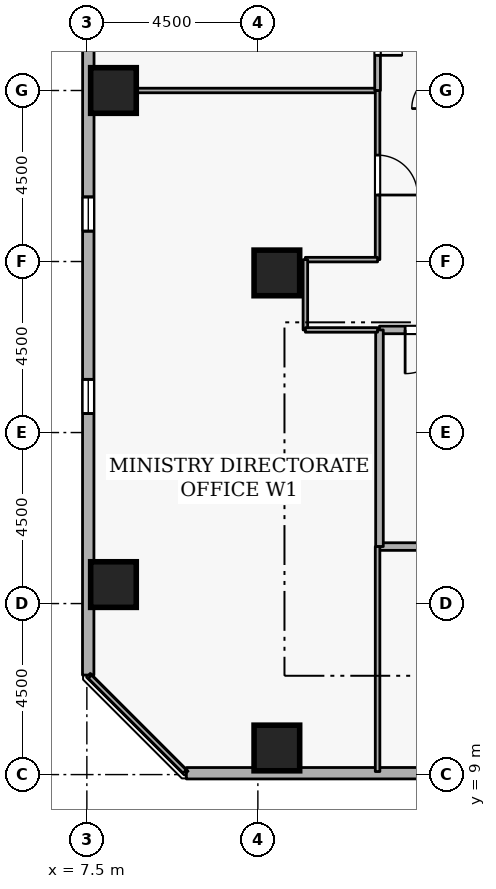
"""IFC4 building model, lengths in metres.
Left out: names, types, materials, properties, quantities, classifications, styles, units other than length and angle.
Written with IfcOpenShell. Run it as: python <this file> out.ifc"""

import sys

from ifc_helpers import new_model, si_unit, direction, frame, frame_2d, origin, origin_2d, place, context, subcontext, project, spatial, rectangle, extrude, element, fill, save


model = new_model("IFC4")
c1 = context("Model", 3, precision=1e-05, world=origin(), true_north=direction((0.0, 1.0)))
c2 = subcontext(c1, "Body", "Model", "MODEL_VIEW")
j1 = project(units=[si_unit("LENGTHUNIT", "METRE"), si_unit("PLANEANGLEUNIT", "RADIAN")], contexts=[c1])
p1 = place(None, origin())
s1 = spatial("IfcSite", under=j1, at=p1, CompositionType="ELEMENT")
p2 = place(p1, origin())
s2 = spatial("IfcBuilding", under=s1, at=p2, CompositionType="ELEMENT")
p3 = place(p2, frame((0.0, 0.0, 90.9)))
s3 = spatial("IfcBuildingStorey", under=s2, at=p3, CompositionType="ELEMENT", Elevation=90.9)
for number, where, z_axis, x_axis in (
    (1, (12.5, 9.7, 0.0), (0.0, 0.0, 1.0), (1.0, 0.0, 0.0)),
    (2, (8.2, 14.0, 0.0), (0.0, 0.0, 1.0), (1.0, 0.0, 0.0)),
    (3, (8.2, 27.0, 0.0), (0.0, 0.0, 1.0), (1.0, 0.0, 0.0)),
    (4, (12.5, 22.2, 0.0), (0.0, 0.0, 1.0), (1.0, 0.0, 0.0)),
):
    element("IfcColumn", number, at=place(p3, frame(where, z_axis=z_axis, x_axis=x_axis)), inside=s3, PredefinedType="COLUMN", context=c2, shape_type="SweptSolid", body=[
        extrude(rectangle(XDim=1.2, YDim=1.2, at=origin_2d()), origin(), (0.0, 0.0, 1.0), 3.6),
    ])
p4 = place(p3, frame((10.119, 9.035, 0.0), z_axis=(0.0, 0.0, 1.0), x_axis=(0.99999997744, 0.000212414941, 0.0)))
e5 = element("IfcWall", 5, at=p4, inside=s3, PredefinedType="STANDARD", context=c2, shape_type="SweptSolid", body=[
    extrude(rectangle(XDim=34.481, YDim=0.3, at=frame_2d((17.24, 0.0))), origin(), (0.0, 0.0, 1.0), 2.7),
])
p5 = place(p4, frame((7.5, 0.0, 0.72)))
e6 = element("IfcOpeningElement", 6, at=p5, cuts=e5, PredefinedType="OPENING", context=c2, shape_type="SweptSolid", body=[
    extrude(rectangle(XDim=0.9, YDim=1.75, at=frame_2d((0.45, 0.875))), frame((0.0, 0.16, 0.0), z_axis=(0.0, -1.0, 0.0), x_axis=(1.0, 0.0, 0.0)), (0.0, 0.0, 1.0), 0.32),
])
p6 = place(p4, frame((12.3, 0.0, 0.72)))
e7 = element("IfcOpeningElement", 7, at=p6, cuts=e5, PredefinedType="OPENING", context=c2, shape_type="SweptSolid", body=[
    extrude(rectangle(XDim=0.9, YDim=1.75, at=frame_2d((0.45, 0.875))), frame((0.0, 0.16, 0.0), z_axis=(0.0, -1.0, 0.0), x_axis=(1.0, 0.0, 0.0)), (0.0, 0.0, 1.0), 0.32),
])
p7 = place(p4, frame((17.1, 0.0, 0.72)))
e8 = element("IfcOpeningElement", 8, at=p7, cuts=e5, PredefinedType="OPENING", context=c2, shape_type="SweptSolid", body=[
    extrude(rectangle(XDim=0.9, YDim=1.75, at=frame_2d((0.45, 0.875))), frame((0.0, 0.16, 0.0), z_axis=(0.0, -1.0, 0.0), x_axis=(1.0, 0.0, 0.0)), (0.0, 0.0, 1.0), 0.32),
])
p8 = place(p4, frame((21.9, 0.0, 0.72)))
e9 = element("IfcOpeningElement", 9, at=p8, cuts=e5, PredefinedType="OPENING", context=c2, shape_type="SweptSolid", body=[
    extrude(rectangle(XDim=0.9, YDim=1.75, at=frame_2d((0.45, 0.875))), frame((0.0, 0.16, 0.0), z_axis=(0.0, -1.0, 0.0), x_axis=(1.0, 0.0, 0.0)), (0.0, 0.0, 1.0), 0.32),
])
p9 = place(p4, frame((31.5, 0.0, 0.72)))
e10 = element("IfcOpeningElement", 10, at=p9, cuts=e5, PredefinedType="OPENING", context=c2, shape_type="SweptSolid", body=[
    extrude(rectangle(XDim=0.9, YDim=1.75, at=frame_2d((0.45, 0.875))), frame((0.0, 0.16, 0.0), z_axis=(0.0, -1.0, 0.0), x_axis=(1.0, 0.0, 0.0)), (0.0, 0.0, 1.0), 0.32),
])
p10 = place(p3, frame((7.543, 46.099, 0.0), z_axis=(0.0, 0.0, 1.0), x_axis=(-0.000212414941, -0.99999997744, 0.0)))
e11 = element("IfcWall", 11, at=p10, inside=s3, PredefinedType="STANDARD", context=c2, shape_type="SweptSolid", body=[
    extrude(rectangle(XDim=34.481, YDim=0.3, at=frame_2d((17.24, 0.0))), origin(), (0.0, 0.0, 1.0), 2.7),
])
p11 = place(p10, frame((7.5, 0.0, 0.72)))
e12 = element("IfcOpeningElement", 12, at=p11, cuts=e11, PredefinedType="OPENING", context=c2, shape_type="SweptSolid", body=[
    extrude(rectangle(XDim=0.9, YDim=1.75, at=frame_2d((0.45, 0.875))), frame((0.0, 0.16, 0.0), z_axis=(0.0, -1.0, 0.0), x_axis=(1.0, 0.0, 0.0)), (0.0, 0.0, 1.0), 0.32),
])
p12 = place(p10, frame((12.3, 0.0, 0.72)))
e13 = element("IfcOpeningElement", 13, at=p12, cuts=e11, PredefinedType="OPENING", context=c2, shape_type="SweptSolid", body=[
    extrude(rectangle(XDim=0.9, YDim=1.75, at=frame_2d((0.45, 0.875))), frame((0.0, 0.16, 0.0), z_axis=(0.0, -1.0, 0.0), x_axis=(1.0, 0.0, 0.0)), (0.0, 0.0, 1.0), 0.32),
])
p13 = place(p10, frame((17.1, 0.0, 0.72)))
e14 = element("IfcOpeningElement", 14, at=p13, cuts=e11, PredefinedType="OPENING", context=c2, shape_type="SweptSolid", body=[
    extrude(rectangle(XDim=0.9, YDim=1.75, at=frame_2d((0.45, 0.875))), frame((0.0, 0.16, 0.0), z_axis=(0.0, -1.0, 0.0), x_axis=(1.0, 0.0, 0.0)), (0.0, 0.0, 1.0), 0.32),
])
p14 = place(p10, frame((21.9, 0.0, 0.72)))
e15 = element("IfcOpeningElement", 15, at=p14, cuts=e11, PredefinedType="OPENING", context=c2, shape_type="SweptSolid", body=[
    extrude(rectangle(XDim=0.9, YDim=1.75, at=frame_2d((0.45, 0.875))), frame((0.0, 0.16, 0.0), z_axis=(0.0, -1.0, 0.0), x_axis=(1.0, 0.0, 0.0)), (0.0, 0.0, 1.0), 0.32),
])
p15 = place(p10, frame((26.7, 0.0, 0.72)))
e16 = element("IfcOpeningElement", 16, at=p15, cuts=e11, PredefinedType="OPENING", context=c2, shape_type="SweptSolid", body=[
    extrude(rectangle(XDim=0.9, YDim=1.75, at=frame_2d((0.45, 0.875))), frame((0.0, 0.16, 0.0), z_axis=(0.0, -1.0, 0.0), x_axis=(1.0, 0.0, 0.0)), (0.0, 0.0, 1.0), 0.32),
])
p16 = place(p3, frame((15.2, 15.0, 0.0), z_axis=(0.0, 0.0, 1.0), x_axis=(1.0, 0.0, 0.0)))
e17 = element("IfcWall", 17, at=p16, inside=s3, PredefinedType="STANDARD", context=c2, shape_type="SweptSolid", body=[
    extrude(rectangle(XDim=2.5, YDim=0.2, at=frame_2d((1.25, 0.0))), origin(), (0.0, 0.0, 1.0), 3.34),
])
p17 = place(p3, frame((17.7, 20.7, 0.0), z_axis=(0.0, 0.0, 1.0), x_axis=(-1.0, 0.0, 0.0)))
e18 = element("IfcWall", 18, at=p17, inside=s3, PredefinedType="STANDARD", context=c2, shape_type="SweptSolid", body=[
    extrude(rectangle(XDim=2.5, YDim=0.2, at=frame_2d((1.25, 0.0))), origin(), (0.0, 0.0, 1.0), 3.34),
])
p18 = place(p17, frame((0.675, 0.0, 0.0)))
e19 = element("IfcOpeningElement", 19, at=p18, cuts=e18, PredefinedType="OPENING", context=c2, shape_type="SweptSolid", body=[
    extrude(rectangle(XDim=1.15, YDim=2.1, at=frame_2d((0.575, 1.05))), frame((0.0, 0.11, 0.0), z_axis=(0.0, -1.0, 0.0), x_axis=(1.0, 0.0, 0.0)), (0.0, 0.0, 1.0), 0.22),
])
p19 = place(p3, frame((15.2, 20.7, 0.0), z_axis=(0.0, 0.0, 1.0), x_axis=(0.0, -1.0, 0.0)))
e20 = element("IfcWall", 20, at=p19, inside=s3, PredefinedType="STANDARD", context=c2, shape_type="SweptSolid", body=[
    extrude(rectangle(XDim=5.7, YDim=0.2, at=frame_2d((2.85, 0.0))), origin(), (0.0, 0.0, 1.0), 3.34),
])
p20 = place(p3, frame((8.2, 27.0, 0.0), z_axis=(0.0, 0.0, 1.0), x_axis=(1.0, 0.0, 0.0)))
e21 = element("IfcWall", 21, at=p20, inside=s3, PredefinedType="PARTITIONING", context=c2, shape_type="SweptSolid", body=[
    extrude(rectangle(XDim=6.95, YDim=0.12, at=frame_2d((3.475, 0.0))), origin(), (0.0, 0.0, 1.0), 2.932),
])
p21 = place(p3, frame((15.15, 27.0, 0.0), z_axis=(0.0, 0.0, 1.0), x_axis=(0.0, -1.0, 0.0)))
e22 = element("IfcWall", 22, at=p21, inside=s3, PredefinedType="PARTITIONING", context=c2, shape_type="SweptSolid", body=[
    extrude(rectangle(XDim=4.45, YDim=0.12, at=frame_2d((2.225, 0.0))), origin(), (0.0, 0.0, 1.0), 3.34),
])
p22 = place(p21, frame((1.7, 0.0, 0.0)))
e23 = element("IfcOpeningElement", 23, at=p22, cuts=e22, PredefinedType="OPENING", context=c2, shape_type="SweptSolid", body=[
    extrude(rectangle(XDim=1.05, YDim=2.1, at=frame_2d((0.525, 1.05))), frame((0.0, 0.07, 0.0), z_axis=(0.0, -1.0, 0.0), x_axis=(1.0, 0.0, 0.0)), (0.0, 0.0, 1.0), 0.14),
])
p23 = place(p3, frame((15.15, 22.55, 0.0), z_axis=(0.0, 0.0, 1.0), x_axis=(-1.0, 0.0, 0.0)))
e24 = element("IfcWall", 24, at=p23, inside=s3, PredefinedType="PARTITIONING", context=c2, shape_type="SweptSolid", body=[
    extrude(rectangle(XDim=1.9, YDim=0.12, at=frame_2d((0.95, 0.0))), origin(), (0.0, 0.0, 1.0), 3.34),
])
p24 = place(p3, frame((13.25, 22.55, 0.0), z_axis=(0.0, 0.0, 1.0), x_axis=(0.0, -1.0, 0.0)))
e25 = element("IfcWall", 25, at=p24, inside=s3, PredefinedType="PARTITIONING", context=c2, shape_type="SweptSolid", body=[
    extrude(rectangle(XDim=1.85, YDim=0.12, at=frame_2d((0.925, 0.0))), origin(), (0.0, 0.0, 1.0), 3.34),
])
p25 = place(p3, frame((13.25, 20.7, 0.0), z_axis=(0.0, 0.0, 1.0), x_axis=(1.0, 0.0, 0.0)))
e26 = element("IfcWall", 26, at=p25, inside=s3, PredefinedType="PARTITIONING", context=c2, shape_type="SweptSolid", body=[
    extrude(rectangle(XDim=1.9, YDim=0.12, at=frame_2d((0.95, 0.0))), origin(), (0.0, 0.0, 1.0), 3.34),
])
p26 = place(p3, frame((15.15, 15.0, 0.0), z_axis=(0.0, 0.0, 1.0), x_axis=(0.0, -1.0, 0.0)))
e27 = element("IfcWall", 27, at=p26, inside=s3, PredefinedType="PARTITIONING", context=c2, shape_type="SweptSolid", body=[
    extrude(rectangle(XDim=5.92, YDim=0.12, at=frame_2d((2.96, 0.0))), origin(), (0.0, 0.0, 1.0), 3.34),
])
p27 = place(p3, frame((10.075, 9.08, 0.0), z_axis=(0.0, 0.0, 1.0), x_axis=(-0.707106781187, 0.707106781187, 0.0)))
e28 = element("IfcWall", 28, at=p27, inside=s3, PredefinedType="PARTITIONING", context=c2, shape_type="SweptSolid", body=[
    extrude(rectangle(XDim=3.528, YDim=0.12, at=frame_2d((1.764, 0.0))), origin(), (0.0, 0.0, 1.0), 3.34),
])
p28 = place(p3, frame((15.15, 30.15, 0.0), z_axis=(0.0, 0.0, 1.0), x_axis=(0.0, -1.0, 0.0)))
e29 = element("IfcWall", 29, at=p28, inside=s3, PredefinedType="PARTITIONING", context=c2, shape_type="SweptSolid", body=[
    extrude(rectangle(XDim=3.15, YDim=0.15, at=frame_2d((1.575, 0.0))), origin(), (0.0, 0.0, 1.0), 3.34),
])
p29 = place(p28, frame((0.925, 0.0, 0.0)))
e30 = element("IfcOpeningElement", 30, at=p29, cuts=e29, PredefinedType="OPENING", context=c2, shape_type="SweptSolid", body=[
    extrude(rectangle(XDim=1.3, YDim=2.12, at=frame_2d((0.65, 1.06))), frame((0.0, 0.085, 0.0), z_axis=(0.0, -1.0, 0.0), x_axis=(1.0, 0.0, 0.0)), (0.0, 0.0, 1.0), 0.17),
])
p30 = place(p14, origin())
e31 = element("IfcWindow", 31, at=p30, inside=s3, PartitioningType="SINGLE_PANEL", PredefinedType="WINDOW", context=c2, shape_type="SweptSolid", body=[
    extrude(rectangle(XDim=0.9, YDim=1.75, at=frame_2d((0.45, 0.875))), frame((0.0, 0.03, 0.0), z_axis=(0.0, -1.0, 0.0), x_axis=(1.0, 0.0, 0.0)), (0.0, 0.0, 1.0), 0.06),
])
fill(e15, e31)
p31 = place(p15, origin())
e32 = element("IfcWindow", 32, at=p31, inside=s3, PartitioningType="SINGLE_PANEL", PredefinedType="WINDOW", context=c2, shape_type="SweptSolid", body=[
    extrude(rectangle(XDim=0.9, YDim=1.75, at=frame_2d((0.45, 0.875))), frame((0.0, 0.03, 0.0), z_axis=(0.0, -1.0, 0.0), x_axis=(1.0, 0.0, 0.0)), (0.0, 0.0, 1.0), 0.06),
])
fill(e16, e32)
p32 = place(p18, origin())
e33 = element("IfcDoor", 33, at=p32, inside=s3, OperationType="SINGLE_SWING_RIGHT", PredefinedType="DOOR", context=c2, shape_type="SweptSolid", body=[
    extrude(rectangle(XDim=1.15, YDim=2.1, at=frame_2d((0.575, 1.05))), frame((0.0, 0.025, 0.0), z_axis=(0.0, -1.0, 0.0), x_axis=(1.0, 0.0, 0.0)), (0.0, 0.0, 1.0), 0.05),
])
fill(e19, e33)
p33 = place(p22, origin())
e34 = element("IfcDoor", 34, at=p33, inside=s3, OperationType="SINGLE_SWING_RIGHT", PredefinedType="DOOR", context=c2, shape_type="SweptSolid", body=[
    extrude(rectangle(XDim=1.05, YDim=2.1, at=frame_2d((0.525, 1.05))), frame((0.0, 0.025, 0.0), z_axis=(0.0, -1.0, 0.0), x_axis=(1.0, 0.0, 0.0)), (0.0, 0.0, 1.0), 0.05),
])
fill(e23, e34)
p34 = place(p29, origin())
e35 = element("IfcDoor", 35, at=p34, inside=s3, OperationType="DOUBLE_DOOR_SINGLE_SWING", PredefinedType="DOOR", context=c2, shape_type="SweptSolid", body=[
    extrude(rectangle(XDim=1.3, YDim=2.12, at=frame_2d((0.65, 1.06))), frame((0.0, 0.025, 0.0), z_axis=(0.0, -1.0, 0.0), x_axis=(1.0, 0.0, 0.0)), (0.0, 0.0, 1.0), 0.05),
])
fill(e30, e35)
save(model, sys.argv[1])
